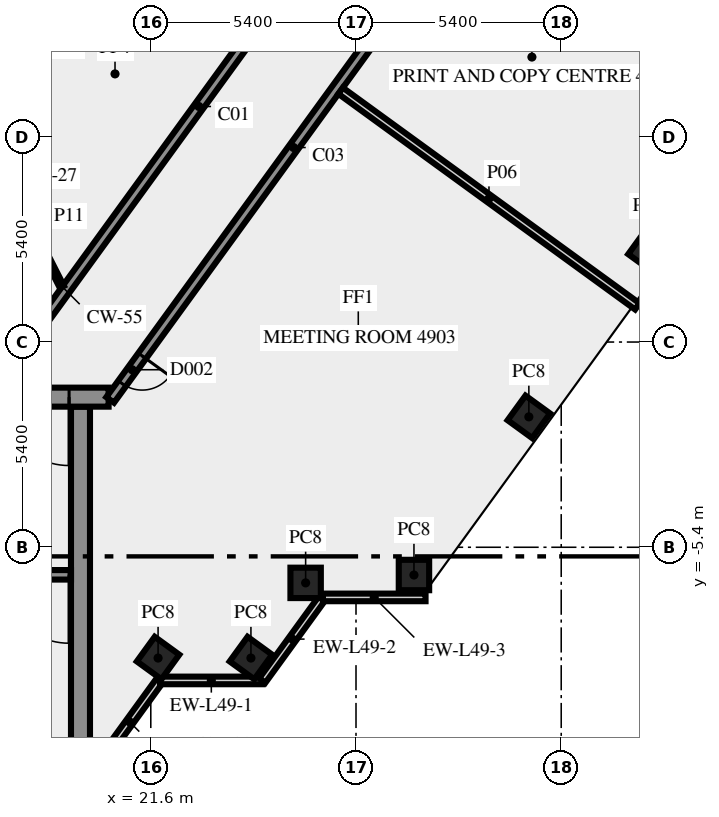
"""IFC4 building model, lengths in metres.
Left out: names, types, materials, properties, quantities, classifications, styles, units other than length and angle.
Written with IfcOpenShell. Run it as: python <this file> out.ifc"""

import sys

from ifc_helpers import new_model, si_unit, direction, frame, frame_2d, origin, origin_2d, place, context, subcontext, project, spatial, rectangle, extrude, element, fill, save


model = new_model("IFC4")
c1 = context("Model", 3, precision=1e-05, world=origin(), true_north=direction((0.0, 1.0)))
c2 = subcontext(c1, "Body", "Model", "MODEL_VIEW")
j1 = project(units=[si_unit("LENGTHUNIT", "METRE"), si_unit("PLANEANGLEUNIT", "RADIAN")], contexts=[c1])
p1 = place(None, origin())
s1 = spatial("IfcSite", under=j1, at=p1, CompositionType="ELEMENT")
p2 = place(p1, origin())
s2 = spatial("IfcBuilding", under=s1, at=p2, CompositionType="ELEMENT")
p3 = place(p2, frame((0.0, 0.0, 210.0)))
s3 = spatial("IfcBuildingStorey", under=s2, at=p3, CompositionType="ELEMENT", Elevation=210.0)
for number, where, z_axis, x_axis in (
    (1, (21.792, -8.315, 0.0), (0.0, 0.0, 1.0), (0.588, 0.809, 0.0)),
    (2, (24.235, -8.315, 0.0), (0.0, 0.0, 1.0), (0.588, 0.809, 0.0)),
    (3, (25.674, -6.337, 0.0), (0.0, 0.0, 1.0), (1.0, 0.0, 0.0)),
    (4, (28.525, -6.13, 0.0), (0.0, 0.0, 1.0), (1.0, 0.0, 0.0)),
    (5, (31.548, -1.969, 0.0), (0.0, 0.0, 1.0), (0.588, 0.809, 0.0)),
    (6, (34.722, 2.4, 0.0), (0.0, 0.0, 1.0), (0.588, 0.809, 0.0)),
):
    element("IfcColumn", number, at=place(p3, frame(where, z_axis=z_axis, x_axis=x_axis)), inside=s3, PredefinedType="COLUMN", context=c2, shape_type="SweptSolid", body=[
        extrude(rectangle(XDim=0.8, YDim=0.8, at=origin_2d()), origin(), (0.0, 0.0, 1.0), 3.65),
    ])
p4 = place(p3, frame((20.253, -11.083, 0.0), z_axis=(0.0, 0.0, 1.0), x_axis=(0.587766567315, 0.809030569476, 0.0)))
e7 = element("IfcWall", 7, at=p4, inside=s3, PredefinedType="SOLIDWALL", context=c2, shape_type="SweptSolid", body=[
    extrude(rectangle(XDim=2.688, YDim=0.2, at=frame_2d((1.344, 0.0))), origin(), (0.0, 0.0, 1.0), 3.65),
])
p5 = place(p3, frame((21.843, -8.904, 0.0), z_axis=(0.0, 0.0, 1.0), x_axis=(1.0, 0.0, 0.0)))
e8 = element("IfcWall", 8, at=p5, inside=s3, PredefinedType="SOLIDWALL", context=c2, shape_type="SweptSolid", body=[
    extrude(rectangle(XDim=2.7, YDim=0.2, at=frame_2d((1.35, 0.0))), origin(), (0.0, 0.0, 1.0), 3.65),
])
p6 = place(p3, frame((24.533, -8.909, 0.0), z_axis=(0.0, 0.0, 1.0), x_axis=(0.587720002413, 0.809064397168, 0.0)))
e9 = element("IfcWall", 9, at=p6, inside=s3, PredefinedType="SOLIDWALL", context=c2, shape_type="SweptSolid", body=[
    extrude(rectangle(XDim=2.7, YDim=0.2, at=frame_2d((1.35, 0.0))), origin(), (0.0, 0.0, 1.0), 3.65),
])
p7 = place(p3, frame((26.13, -6.719, 0.0), z_axis=(0.0, 0.0, 1.0), x_axis=(1.0, 0.0, 0.0)))
e10 = element("IfcWall", 10, at=p7, inside=s3, PredefinedType="SOLIDWALL", context=c2, shape_type="SweptSolid", body=[
    extrude(rectangle(XDim=2.7, YDim=0.2, at=frame_2d((1.35, 0.0))), origin(), (0.0, 0.0, 1.0), 3.65),
])
p8 = place(p3, frame((19.75, -10.5, 0.0), z_axis=(0.0, 0.0, 1.0), x_axis=(0.0, 1.0, 0.0)))
e11 = element("IfcWall", 11, at=p8, inside=s3, PredefinedType="SHEAR", context=c2, shape_type="SweptSolid", body=[
    extrude(rectangle(XDim=8.8, YDim=0.5, at=frame_2d((4.4, 0.0))), origin(), (0.0, 0.0, 1.0), 3.65),
])
p9 = place(p3, frame((19.5, -6.125, 0.0), z_axis=(0.0, 0.0, 1.0), x_axis=(-1.0, 0.0, 0.0)))
e12 = element("IfcWall", 12, at=p9, inside=s3, PredefinedType="SHEAR", context=c2, shape_type="SweptSolid", body=[
    extrude(rectangle(XDim=8.05, YDim=0.25, at=frame_2d((4.025, 0.0))), origin(), (0.0, 0.0, 1.0), 3.65),
])
p10 = place(p9, frame((0.05, 0.0, 0.0)))
e13 = element("IfcOpeningElement", 13, at=p10, cuts=e12, PredefinedType="OPENING", context=c2, shape_type="SweptSolid", body=[
    extrude(rectangle(XDim=1.8, YDim=2.1, at=frame_2d((0.9, 1.05))), frame((0.0, 0.135, 0.0), z_axis=(0.0, -1.0, 0.0), x_axis=(1.0, 0.0, 0.0)), (0.0, 0.0, 1.0), 0.27),
])
p11 = place(p3, frame((20.49, -1.45, 0.0), z_axis=(0.0, 0.0, 1.0), x_axis=(-1.0, 0.0, 0.0)))
e14 = element("IfcWall", 14, at=p11, inside=s3, PredefinedType="SHEAR", context=c2, shape_type="SweptSolid", body=[
    extrude(rectangle(XDim=40.98, YDim=0.5, at=frame_2d((20.49, 0.0))), origin(), (0.0, 0.0, 1.0), 3.65),
])
p12 = place(p11, frame((38.14, 0.0, 0.0)))
e15 = element("IfcOpeningElement", 15, at=p12, cuts=e14, PredefinedType="OPENING", context=c2, shape_type="SweptSolid", body=[
    extrude(rectangle(XDim=1.8, YDim=2.1, at=frame_2d((0.9, 1.05))), frame((0.0, 0.26, 0.0), z_axis=(0.0, -1.0, 0.0), x_axis=(1.0, 0.0, 0.0)), (0.0, 0.0, 1.0), 0.52),
])
p13 = place(p11, frame((36.728, 0.0, 0.0)))
e16 = element("IfcOpeningElement", 16, at=p13, cuts=e14, PredefinedType="OPENING", context=c2, shape_type="SweptSolid", body=[
    extrude(rectangle(XDim=0.8, YDim=2.1, at=frame_2d((0.4, 1.05))), frame((0.0, 0.26, 0.0), z_axis=(0.0, -1.0, 0.0), x_axis=(1.0, 0.0, 0.0)), (0.0, 0.0, 1.0), 0.52),
])
p14 = place(p11, frame((35.153, 0.0, 0.0)))
e17 = element("IfcOpeningElement", 17, at=p14, cuts=e14, PredefinedType="OPENING", context=c2, shape_type="SweptSolid", body=[
    extrude(rectangle(XDim=0.8, YDim=2.1, at=frame_2d((0.4, 1.05))), frame((0.0, 0.26, 0.0), z_axis=(0.0, -1.0, 0.0), x_axis=(1.0, 0.0, 0.0)), (0.0, 0.0, 1.0), 0.52),
])
p15 = place(p11, frame((32.94, 0.0, 0.0)))
e18 = element("IfcOpeningElement", 18, at=p15, cuts=e14, PredefinedType="OPENING", context=c2, shape_type="SweptSolid", body=[
    extrude(rectangle(XDim=0.9, YDim=2.1, at=frame_2d((0.45, 1.05))), frame((0.0, 0.26, 0.0), z_axis=(0.0, -1.0, 0.0), x_axis=(1.0, 0.0, 0.0)), (0.0, 0.0, 1.0), 0.52),
])
p16 = place(p11, frame((30.702, 0.0, 0.0)))
e19 = element("IfcOpeningElement", 19, at=p16, cuts=e14, PredefinedType="OPENING", context=c2, shape_type="SweptSolid", body=[
    extrude(rectangle(XDim=0.9, YDim=2.1, at=frame_2d((0.45, 1.05))), frame((0.0, 0.26, 0.0), z_axis=(0.0, -1.0, 0.0), x_axis=(1.0, 0.0, 0.0)), (0.0, 0.0, 1.0), 0.52),
])
p17 = place(p11, frame((28.64, 0.0, 0.0)))
e20 = element("IfcOpeningElement", 20, at=p17, cuts=e14, PredefinedType="OPENING", context=c2, shape_type="SweptSolid", body=[
    extrude(rectangle(XDim=0.9, YDim=2.1, at=frame_2d((0.45, 1.05))), frame((0.0, 0.26, 0.0), z_axis=(0.0, -1.0, 0.0), x_axis=(1.0, 0.0, 0.0)), (0.0, 0.0, 1.0), 0.52),
])
p18 = place(p11, frame((25.778, 0.0, 0.0)))
e21 = element("IfcOpeningElement", 21, at=p18, cuts=e14, PredefinedType="OPENING", context=c2, shape_type="SweptSolid", body=[
    extrude(rectangle(XDim=0.9, YDim=2.1, at=frame_2d((0.45, 1.05))), frame((0.0, 0.26, 0.0), z_axis=(0.0, -1.0, 0.0), x_axis=(1.0, 0.0, 0.0)), (0.0, 0.0, 1.0), 0.52),
])
p19 = place(p11, frame((19.59, 0.0, 0.0)))
e22 = element("IfcOpeningElement", 22, at=p19, cuts=e14, PredefinedType="OPENING", context=c2, shape_type="SweptSolid", body=[
    extrude(rectangle(XDim=2.0, YDim=2.1, at=frame_2d((1.0, 1.05))), frame((0.0, 0.26, 0.0), z_axis=(0.0, -1.0, 0.0), x_axis=(1.0, 0.0, 0.0)), (0.0, 0.0, 1.0), 0.52),
])
p20 = place(p11, frame((7.14, 0.0, 0.0)))
e23 = element("IfcOpeningElement", 23, at=p20, cuts=e14, PredefinedType="OPENING", context=c2, shape_type="SweptSolid", body=[
    extrude(rectangle(XDim=0.9, YDim=2.1, at=frame_2d((0.45, 1.05))), frame((0.0, 0.26, 0.0), z_axis=(0.0, -1.0, 0.0), x_axis=(1.0, 0.0, 0.0)), (0.0, 0.0, 1.0), 0.52),
])
p21 = place(p11, frame((4.19, 0.0, 0.0)))
e24 = element("IfcOpeningElement", 24, at=p21, cuts=e14, PredefinedType="OPENING", context=c2, shape_type="SweptSolid", body=[
    extrude(rectangle(XDim=0.9, YDim=2.1, at=frame_2d((0.45, 1.05))), frame((0.0, 0.26, 0.0), z_axis=(0.0, -1.0, 0.0), x_axis=(1.0, 0.0, 0.0)), (0.0, 0.0, 1.0), 0.52),
])
p22 = place(p11, frame((1.04, 0.0, 0.0)))
e25 = element("IfcOpeningElement", 25, at=p22, cuts=e14, PredefinedType="OPENING", context=c2, shape_type="SweptSolid", body=[
    extrude(rectangle(XDim=1.8, YDim=2.1, at=frame_2d((0.9, 1.05))), frame((0.0, 0.26, 0.0), z_axis=(0.0, -1.0, 0.0), x_axis=(1.0, 0.0, 0.0)), (0.0, 0.0, 1.0), 0.52),
])
p23 = place(p3, frame((17.545, -1.125, 0.0), z_axis=(0.0, 0.0, 1.0), x_axis=(0.58779555165, 0.809009511354, 0.0)))
e26 = element("IfcWall", 26, at=p23, inside=s3, PredefinedType="SOLIDWALL", context=c2, shape_type="SweptSolid", body=[
    extrude(rectangle(XDim=18.103, YDim=0.25, at=frame_2d((9.052, 0.0))), origin(), (0.0, 0.0, 1.0), 3.65),
])
p24 = place(p23, frame((16.728, 0.0, 0.0)))
e27 = element("IfcOpeningElement", 27, at=p24, cuts=e26, PredefinedType="OPENING", context=c2, shape_type="SweptSolid", body=[
    extrude(rectangle(XDim=0.9, YDim=2.1, at=frame_2d((0.45, 1.05))), frame((0.0, 0.135, 0.0), z_axis=(0.0, -1.0, 0.0), x_axis=(1.0, 0.0, 0.0)), (0.0, 0.0, 1.0), 0.27),
])
p25 = place(p3, frame((30.183, 11.761, 0.0), z_axis=(0.0, 0.0, 1.0), x_axis=(-0.587781762867, -0.80901952958, 0.0)))
e28 = element("IfcWall", 28, at=p25, inside=s3, PredefinedType="SOLIDWALL", context=c2, shape_type="SweptSolid", body=[
    extrude(rectangle(XDim=16.42, YDim=0.25, at=frame_2d((8.21, 0.0))), origin(), (0.0, 0.0, 1.0), 3.65),
])
p26 = place(p25, frame((14.988, 0.0, 0.0)))
e29 = element("IfcOpeningElement", 29, at=p26, cuts=e28, PredefinedType="OPENING", context=c2, shape_type="SweptSolid", body=[
    extrude(rectangle(XDim=0.9, YDim=2.1, at=frame_2d((0.45, 1.05))), frame((0.0, 0.135, 0.0), z_axis=(0.0, -1.0, 0.0), x_axis=(1.0, 0.0, 0.0)), (0.0, 0.0, 1.0), 0.27),
])
p27 = place(p25, frame((0.225, 0.0, 0.0)))
e30 = element("IfcOpeningElement", 30, at=p27, cuts=e28, PredefinedType="OPENING", context=c2, shape_type="SweptSolid", body=[
    extrude(rectangle(XDim=0.9, YDim=2.1, at=frame_2d((0.45, 1.05))), frame((0.0, 0.135, 0.0), z_axis=(0.0, -1.0, 0.0), x_axis=(1.0, 0.0, 0.0)), (0.0, 0.0, 1.0), 0.27),
])
p28 = place(p3, frame((34.403, 0.938, 0.0), z_axis=(0.0, 0.0, 1.0), x_axis=(-0.808990890476, 0.587821179549, 0.0)))
e31 = element("IfcWall", 31, at=p28, inside=s3, PredefinedType="SOLIDWALL", context=c2, shape_type="SweptSolid", body=[
    extrude(rectangle(XDim=9.651, YDim=0.2, at=frame_2d((4.826, 0.0))), origin(), (0.0, 0.0, 1.0), 2.85),
])
p29 = place(p3, frame((30.415, 11.902, 0.0), z_axis=(0.0, 0.0, 1.0), x_axis=(0.809012783133, -0.587791048526, 0.0)))
e32 = element("IfcWall", 32, at=p29, inside=s3, PredefinedType="SOLIDWALL", context=c2, shape_type="SweptSolid", body=[
    extrude(rectangle(XDim=8.62, YDim=0.2, at=frame_2d((4.31, 0.0))), origin(), (0.0, 0.0, 1.0), 3.65),
])
p30 = place(p3, frame((18.0, 3.925, 0.0), z_axis=(0.0, 0.0, 1.0), x_axis=(0.453950796792, -0.891026752736, 0.0)))
e33 = element("IfcWall", 33, at=p30, inside=s3, PredefinedType="PARTITIONING", context=c2, shape_type="SweptSolid", body=[
    extrude(rectangle(XDim=2.778, YDim=0.12, at=frame_2d((1.389, 0.0))), origin(), (0.0, 0.0, 1.0), 3.65),
])
p31 = place(p10, origin())
e34 = element("IfcDoor", 34, at=p31, inside=s3, OperationType="DOUBLE_DOOR_SINGLE_SWING", PredefinedType="DOOR", context=c2, shape_type="SweptSolid", body=[
    extrude(rectangle(XDim=1.8, YDim=2.1, at=frame_2d((0.9, 1.05))), frame((0.0, 0.025, 0.0), z_axis=(0.0, -1.0, 0.0), x_axis=(1.0, 0.0, 0.0)), (0.0, 0.0, 1.0), 0.05),
])
fill(e13, e34)
p32 = place(p22, origin())
e35 = element("IfcDoor", 35, at=p32, inside=s3, OperationType="DOUBLE_DOOR_SINGLE_SWING", PredefinedType="DOOR", context=c2, shape_type="SweptSolid", body=[
    extrude(rectangle(XDim=1.8, YDim=2.1, at=frame_2d((0.9, 1.05))), frame((0.0, 0.025, 0.0), z_axis=(0.0, -1.0, 0.0), x_axis=(1.0, 0.0, 0.0)), (0.0, 0.0, 1.0), 0.05),
])
fill(e25, e35)
p33 = place(p26, origin())
e36 = element("IfcDoor", 36, at=p33, inside=s3, OperationType="SINGLE_SWING_RIGHT", PredefinedType="DOOR", context=c2, shape_type="SweptSolid", body=[
    extrude(rectangle(XDim=0.9, YDim=2.1, at=frame_2d((0.45, 1.05))), frame((0.0, 0.025, 0.0), z_axis=(0.0, -1.0, 0.0), x_axis=(1.0, 0.0, 0.0)), (0.0, 0.0, 1.0), 0.05),
])
fill(e29, e36)
save(model, sys.argv[1])
